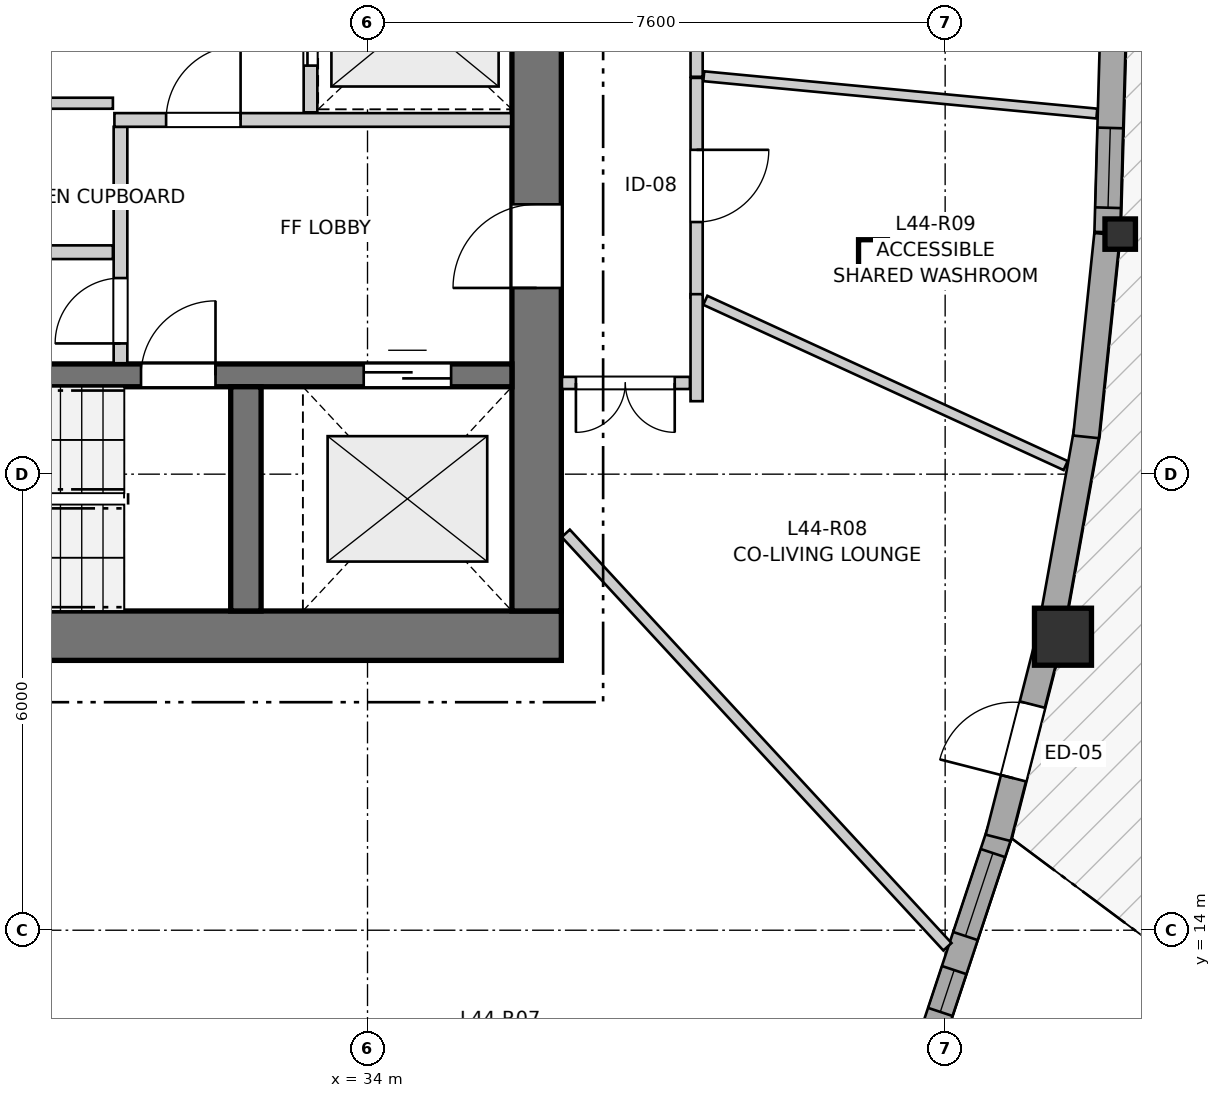
"""IFC4 building model, lengths in metres.
Left out: names, types, materials, properties, quantities, classifications, styles, units other than length and angle.
Written with IfcOpenShell. Run it as: python <this file> out.ifc"""

import sys

from ifc_helpers import new_model, si_unit, direction, frame, frame_2d, origin, origin_2d, place, context, subcontext, project, spatial, rectangle, i_section, extrude, source, transform, mapped, element, fill, save


model = new_model("IFC4")
c1 = context("Model", 3, precision=1e-05, world=origin(), true_north=direction((0.0, 1.0)))
c2 = subcontext(c1, "Body", "Model", "MODEL_VIEW")
j1 = project(units=[si_unit("LENGTHUNIT", "METRE"), si_unit("PLANEANGLEUNIT", "RADIAN")], contexts=[c1])
p1 = place(None, origin())
s1 = spatial("IfcSite", under=j1, at=p1, CompositionType="ELEMENT")
p2 = place(p1, origin())
s2 = spatial("IfcBuilding", under=s1, at=p2, CompositionType="ELEMENT")
p3 = place(p2, frame((0.0, 0.0, 149.0)))
s3 = spatial("IfcBuildingStorey", under=s2, at=p3, CompositionType="ELEMENT", Elevation=149.0)
p4 = place(p3, frame((24.15, 17.875, 0.0), z_axis=(0.0, 0.0, 1.0), x_axis=(1.0, 0.0, 0.0)))
e1 = element("IfcWall", 1, at=p4, inside=s3, PredefinedType="SHEAR", context=c2, shape_type="SweptSolid", body=[
    extrude(rectangle(XDim=12.4, YDim=0.65, at=frame_2d((6.2, 0.0))), origin(), (0.0, 0.0, 1.0), 2.935),
])
p5 = place(p3, frame((36.225, 18.2, 0.0), z_axis=(0.0, 0.0, 1.0), x_axis=(0.0, 1.0, 0.0)))
e2 = element("IfcWall", 2, at=p5, inside=s3, PredefinedType="SHEAR", context=c2, shape_type="SweptSolid", body=[
    extrude(rectangle(XDim=15.6, YDim=0.65, at=frame_2d((7.8, 0.0))), origin(), (0.0, 0.0, 1.0), 2.935),
])
p6 = place(p5, frame((4.25, 0.0, 0.0)))
e3 = element("IfcOpeningElement", 3, at=p6, cuts=e2, PredefinedType="OPENING", context=c2, shape_type="SweptSolid", body=[
    extrude(rectangle(XDim=1.1, YDim=2.15, at=frame_2d((0.55, 1.075))), frame((0.0, 0.335, 0.0), z_axis=(0.0, -1.0, 0.0), x_axis=(1.0, 0.0, 0.0)), (0.0, 0.0, 1.0), 0.67),
])
p7 = place(p5, frame((10.25, 0.0, 0.0)))
e4 = element("IfcOpeningElement", 4, at=p7, cuts=e2, PredefinedType="OPENING", context=c2, shape_type="SweptSolid", body=[
    extrude(rectangle(XDim=1.1, YDim=2.15, at=frame_2d((0.55, 1.075))), frame((0.0, 0.335, 0.0), z_axis=(0.0, -1.0, 0.0), x_axis=(1.0, 0.0, 0.0)), (0.0, 0.0, 1.0), 0.67),
])
p8 = place(p3, frame((24.8, 21.3, 0.0), z_axis=(0.0, 0.0, 1.0), x_axis=(1.0, 0.0, 0.0)))
e5 = element("IfcWall", 5, at=p8, inside=s3, PredefinedType="SHEAR", context=c2, shape_type="SweptSolid", body=[
    extrude(rectangle(XDim=11.1, YDim=0.3, at=frame_2d((5.55, 0.0))), origin(), (0.0, 0.0, 1.0), 2.935),
])
p9 = place(p8, frame((6.22, 0.0, 0.0)))
e6 = element("IfcOpeningElement", 6, at=p9, cuts=e5, PredefinedType="OPENING", context=c2, shape_type="SweptSolid", body=[
    extrude(rectangle(XDim=0.98, YDim=2.15, at=frame_2d((0.49, 1.075))), frame((0.0, 0.16, 0.0), z_axis=(0.0, -1.0, 0.0), x_axis=(1.0, 0.0, 0.0)), (0.0, 0.0, 1.0), 0.32),
])
p10 = place(p8, frame((9.15, 0.0, 0.0)))
e7 = element("IfcOpeningElement", 7, at=p10, cuts=e5, PredefinedType="OPENING", context=c2, shape_type="SweptSolid", body=[
    extrude(rectangle(XDim=1.15, YDim=2.15, at=frame_2d((0.575, 1.075))), frame((0.0, 0.16, 0.0), z_axis=(0.0, -1.0, 0.0), x_axis=(1.0, 0.0, 0.0)), (0.0, 0.0, 1.0), 0.32),
])
p11 = place(p3, frame((32.4, 18.2, 0.0), z_axis=(0.0, 0.0, 1.0), x_axis=(0.0, 1.0, 0.0)))
e8 = element("IfcWall", 8, at=p11, inside=s3, PredefinedType="SHEAR", context=c2, shape_type="SweptSolid", body=[
    extrude(rectangle(XDim=2.95, YDim=0.4, at=frame_2d((1.475, 0.0))), origin(), (0.0, 0.0, 1.0), 2.935),
])
m1 = source(origin(), c2, "Body", "SweptSolid", [
    extrude(rectangle(XDim=0.75, YDim=0.75, at=origin_2d()), origin(), (0.0, 0.0, 1.0), 2.935),
])
p12 = place(p3, frame((43.15, 17.862, 0.0), z_axis=(0.0, 0.0, 1.0), x_axis=(1.0, 0.0, 0.0)))
e9 = element("IfcColumn", 9, at=p12, inside=s3, PredefinedType="COLUMN", context=c2, shape_type="MappedRepresentation", body=[
    mapped(m1, transform((0.0, 0.0, 0.0), x_axis=(1.0, 0.0, 0.0), y_axis=(0.0, 1.0, 0.0), z_axis=(0.0, 0.0, 1.0), scale=1.0)),
])
m2 = source(origin(), c2, "Body", "SweptSolid", [
    extrude(i_section(OverallWidth=0.401, OverallDepth=0.399, WebThickness=0.023, FlangeThickness=0.036, FilletRadius=0.015, at=origin_2d()), origin(), (0.0, 0.0, 1.0), 2.935),
])
p13 = place(p3, frame((43.903, 23.158, 0.0), z_axis=(0.0, 0.0, 1.0), x_axis=(1.0, 0.0, 0.0)))
e10 = element("IfcColumn", 10, at=p13, inside=s3, PredefinedType="PILASTER", context=c2, shape_type="MappedRepresentation", body=[
    mapped(m2, transform((0.0, 0.0, 0.0), x_axis=(1.0, 0.0, 0.0), y_axis=(0.0, 1.0, 0.0), z_axis=(0.0, 0.0, 1.0), scale=1.0)),
])
p14 = place(p3, frame((41.438, 12.629, 0.0), z_axis=(0.0, 0.0, 1.0), x_axis=(0.314534815528, 0.949245937479, 0.0)))
e11 = element("IfcWall", 11, at=p14, inside=s3, PredefinedType="SOLIDWALL", context=c2, shape_type="SweptSolid", body=[
    extrude(rectangle(XDim=2.813, YDim=0.34, at=frame_2d((1.406, 0.0))), origin(), (0.0, 0.0, 1.0), 2.515),
])
p15 = place(p14, frame((0.312, 0.0, 0.82)))
e12 = element("IfcOpeningElement", 12, at=p15, cuts=e11, PredefinedType="OPENING", context=c2, shape_type="SweptSolid", body=[
    extrude(rectangle(XDim=0.58, YDim=1.35, at=frame_2d((0.29, 0.675))), frame((0.0, 0.18, 0.0), z_axis=(0.0, -1.0, 0.0), x_axis=(1.0, 0.0, 0.0)), (0.0, 0.0, 1.0), 0.36),
])
p16 = place(p14, frame((1.363, 0.0, 0.82)))
e13 = element("IfcOpeningElement", 13, at=p16, cuts=e11, PredefinedType="OPENING", context=c2, shape_type="SweptSolid", body=[
    extrude(rectangle(XDim=1.15, YDim=1.2, at=frame_2d((0.575, 0.6))), frame((0.0, 0.18, 0.0), z_axis=(0.0, -1.0, 0.0), x_axis=(1.0, 0.0, 0.0)), (0.0, 0.0, 1.0), 0.36),
])
p17 = place(p3, frame((42.298, 15.215, 0.0), z_axis=(0.0, 0.0, 1.0), x_axis=(0.24779460158, 0.968812590457, 0.0)))
e14 = element("IfcWall", 14, at=p17, inside=s3, PredefinedType="SOLIDWALL", context=c2, shape_type="SweptSolid", body=[
    extrude(rectangle(XDim=2.62, YDim=0.34, at=frame_2d((1.31, 0.0))), origin(), (0.0, 0.0, 1.0), 2.515),
])
p18 = place(p17, frame((0.81, 0.0, 0.0)))
e15 = element("IfcOpeningElement", 15, at=p18, cuts=e14, PredefinedType="OPENING", context=c2, shape_type="SweptSolid", body=[
    extrude(rectangle(XDim=1.0, YDim=2.1, at=frame_2d((0.5, 1.05))), frame((0.0, 0.18, 0.0), z_axis=(0.0, -1.0, 0.0), x_axis=(1.0, 0.0, 0.0)), (0.0, 0.0, 1.0), 0.36),
])
p19 = place(p3, frame((43.01, 18.044, 0.0), z_axis=(0.0, 0.0, 1.0), x_axis=(0.177116262048, 0.984189935794, 0.0)))
e16 = element("IfcWall", 16, at=p19, inside=s3, PredefinedType="SOLIDWALL", context=c2, shape_type="SweptSolid", body=[
    extrude(rectangle(XDim=2.575, YDim=0.34, at=frame_2d((1.288, 0.0))), origin(), (0.0, 0.0, 1.0), 2.515),
])
p20 = place(p3, frame((43.454, 20.49, 0.0), z_axis=(0.0, 0.0, 1.0), x_axis=(0.103669919384, 0.994611757328, 0.0)))
e17 = element("IfcWall", 17, at=p20, inside=s3, PredefinedType="SOLIDWALL", context=c2, shape_type="SweptSolid", body=[
    extrude(rectangle(XDim=2.68, YDim=0.34, at=frame_2d((1.34, 0.0))), origin(), (0.0, 0.0, 1.0), 2.515),
])
p21 = place(p3, frame((43.734, 23.183, 0.0), z_axis=(0.0, 0.0, 1.0), x_axis=(0.028311286797, 0.999599155182, 0.0)))
e18 = element("IfcWall", 18, at=p21, inside=s3, PredefinedType="SOLIDWALL", context=c2, shape_type="SweptSolid", body=[
    extrude(rectangle(XDim=2.665, YDim=0.34, at=frame_2d((1.332, 0.0))), origin(), (0.0, 0.0, 1.0), 2.515),
])
p22 = place(p21, frame((0.323, 0.0, 0.82)))
e19 = element("IfcOpeningElement", 19, at=p22, cuts=e18, PredefinedType="OPENING", context=c2, shape_type="SweptSolid", body=[
    extrude(rectangle(XDim=1.05, YDim=1.45, at=frame_2d((0.525, 0.725))), frame((0.0, 0.18, 0.0), z_axis=(0.0, -1.0, 0.0), x_axis=(1.0, 0.0, 0.0)), (0.0, 0.0, 1.0), 0.36),
])
p23 = place(p3, frame((30.75, 21.46, 0.0), z_axis=(0.0, 0.0, 1.0), x_axis=(0.0, 1.0, 0.0)))
e20 = element("IfcWall", 20, at=p23, inside=s3, PredefinedType="PARTITIONING", context=c2, shape_type="SweptSolid", body=[
    extrude(rectangle(XDim=3.11, YDim=0.18, at=frame_2d((1.555, 0.0))), origin(), (0.0, 0.0, 1.0), 2.935),
])
p24 = place(p23, frame((0.26, 0.0, 0.0)))
e21 = element("IfcOpeningElement", 21, at=p24, cuts=e20, PredefinedType="OPENING", context=c2, shape_type="SweptSolid", body=[
    extrude(rectangle(XDim=0.86, YDim=2.05, at=frame_2d((0.43, 1.025))), frame((0.0, 0.1, 0.0), z_axis=(0.0, -1.0, 0.0), x_axis=(1.0, 0.0, 0.0)), (0.0, 0.0, 1.0), 0.2),
])
p25 = place(p3, frame((30.67, 24.66, 0.0), z_axis=(0.0, 0.0, 1.0), x_axis=(1.0, 0.0, 0.0)))
e22 = element("IfcWall", 22, at=p25, inside=s3, PredefinedType="PARTITIONING", context=c2, shape_type="SweptSolid", body=[
    extrude(rectangle(XDim=5.22, YDim=0.18, at=frame_2d((2.61, 0.0))), origin(), (0.0, 0.0, 1.0), 2.935),
])
p26 = place(p25, frame((0.68, 0.0, 0.0)))
e23 = element("IfcOpeningElement", 23, at=p26, cuts=e22, PredefinedType="OPENING", context=c2, shape_type="SweptSolid", body=[
    extrude(rectangle(XDim=0.98, YDim=2.15, at=frame_2d((0.49, 1.075))), frame((0.0, 0.1, 0.0), z_axis=(0.0, -1.0, 0.0), x_axis=(1.0, 0.0, 0.0)), (0.0, 0.0, 1.0), 0.2),
])
p27 = place(p3, frame((33.25, 24.76, 0.0), z_axis=(0.0, 0.0, 1.0), x_axis=(0.0, 1.0, 0.0)))
e24 = element("IfcWall", 24, at=p27, inside=s3, PredefinedType="PARTITIONING", context=c2, shape_type="SweptSolid", body=[
    extrude(rectangle(XDim=2.48, YDim=0.18, at=frame_2d((1.24, 0.0))), origin(), (0.0, 0.0, 1.0), 2.935),
])
p28 = place(p27, frame((0.615, 0.0, 0.0)))
e25 = element("IfcOpeningElement", 25, at=p28, cuts=e24, PredefinedType="OPENING", context=c2, shape_type="SweptSolid", body=[
    extrude(rectangle(XDim=1.25, YDim=2.15, at=frame_2d((0.625, 1.075))), frame((0.0, 0.1, 0.0), z_axis=(0.0, -1.0, 0.0), x_axis=(1.0, 0.0, 0.0)), (0.0, 0.0, 1.0), 0.2),
])
p29 = place(p3, frame((24.81, 22.92, 0.0), z_axis=(0.0, 0.0, 1.0), x_axis=(1.0, 0.0, 0.0)))
e26 = element("IfcWall", 26, at=p29, inside=s3, PredefinedType="PARTITIONING", context=c2, shape_type="SweptSolid", body=[
    extrude(rectangle(XDim=5.84, YDim=0.18, at=frame_2d((2.92, 0.0))), origin(), (0.0, 0.0, 1.0), 2.935),
])
p30 = place(p3, frame((28.13, 24.88, 0.0), z_axis=(0.0, 0.0, 1.0), x_axis=(1.0, 0.0, 0.0)))
e27 = element("IfcWall", 27, at=p30, inside=s3, PredefinedType="PARTITIONING", context=c2, shape_type="SweptSolid", body=[
    extrude(rectangle(XDim=2.52, YDim=0.145, at=frame_2d((1.26, 0.0))), origin(), (0.0, 0.0, 1.0), 2.935),
])
p31 = place(p30, frame((0.82, 0.0, 0.0)))
e28 = element("IfcOpeningElement", 28, at=p31, cuts=e27, PredefinedType="OPENING", context=c2, shape_type="SweptSolid", body=[
    extrude(rectangle(XDim=0.86, YDim=2.05, at=frame_2d((0.43, 1.025))), frame((0.0, 0.083, 0.0), z_axis=(0.0, -1.0, 0.0), x_axis=(1.0, 0.0, 0.0)), (0.0, 0.0, 1.0), 0.165),
])
p32 = place(p3, frame((38.33, 29.792, 0.0), z_axis=(0.0, 0.0, 1.0), x_axis=(0.0, -1.0, 0.0)))
e29 = element("IfcWall", 29, at=p32, inside=s3, PredefinedType="PARTITIONING", context=c2, shape_type="SweptSolid", body=[
    extrude(rectangle(XDim=4.564, YDim=0.16, at=frame_2d((2.282, 0.0))), origin(), (0.0, 0.0, 1.0), 2.935),
])
p33 = place(p32, frame((0.487, 0.0, 0.0)))
e30 = element("IfcOpeningElement", 30, at=p33, cuts=e29, PredefinedType="OPENING", context=c2, shape_type="SweptSolid", body=[
    extrude(rectangle(XDim=0.92, YDim=2.1, at=frame_2d((0.46, 1.05))), frame((0.0, 0.09, 0.0), z_axis=(0.0, -1.0, 0.0), x_axis=(1.0, 0.0, 0.0)), (0.0, 0.0, 1.0), 0.18),
])
p34 = place(p3, frame((38.33, 25.213, 0.0), z_axis=(0.0, 0.0, 1.0), x_axis=(0.0, -1.0, 0.0)))
e31 = element("IfcWall", 31, at=p34, inside=s3, PredefinedType="PARTITIONING", context=c2, shape_type="SweptSolid", body=[
    extrude(rectangle(XDim=2.89, YDim=0.16, at=frame_2d((1.445, 0.0))), origin(), (0.0, 0.0, 1.0), 2.935),
])
p35 = place(p34, frame((0.946, 0.0, 0.0)))
e32 = element("IfcOpeningElement", 32, at=p35, cuts=e31, PredefinedType="OPENING", context=c2, shape_type="SweptSolid", body=[
    extrude(rectangle(XDim=0.95, YDim=2.1, at=frame_2d((0.475, 1.05))), frame((0.0, 0.09, 0.0), z_axis=(0.0, -1.0, 0.0), x_axis=(1.0, 0.0, 0.0)), (0.0, 0.0, 1.0), 0.18),
])
p36 = place(p3, frame((38.242, 21.2, 0.0), z_axis=(0.0, 0.0, 1.0), x_axis=(-1.0, 0.0, 0.0)))
e33 = element("IfcWall", 33, at=p36, inside=s3, PredefinedType="PARTITIONING", context=c2, shape_type="SweptSolid", body=[
    extrude(rectangle(XDim=1.684, YDim=0.16, at=frame_2d((0.842, 0.0))), origin(), (0.0, 0.0, 1.0), 2.935),
])
p37 = place(p36, frame((0.2, 0.0, 0.0)))
e34 = element("IfcOpeningElement", 34, at=p37, cuts=e33, PredefinedType="OPENING", context=c2, shape_type="SweptSolid", body=[
    extrude(rectangle(XDim=1.3, YDim=2.1, at=frame_2d((0.65, 1.05))), frame((0.0, 0.09, 0.0), z_axis=(0.0, -1.0, 0.0), x_axis=(1.0, 0.0, 0.0)), (0.0, 0.0, 1.0), 0.18),
])
p38 = place(p3, frame((36.609, 19.221, 0.0), z_axis=(0.0, 0.0, 1.0), x_axis=(0.67832941292, -0.734757924467, 0.0)))
e35 = element("IfcWall", 35, at=p38, inside=s3, PredefinedType="PARTITIONING", context=c2, shape_type="SweptSolid", body=[
    extrude(rectangle(XDim=7.403, YDim=0.145, at=frame_2d((3.701, 0.0))), origin(), (0.0, 0.0, 1.0), 2.935),
])
p39 = place(p3, frame((38.444, 22.288, 0.0), z_axis=(0.0, 0.0, 1.0), x_axis=(0.908945866603, -0.416914153736, 0.0)))
e36 = element("IfcWall", 36, at=p39, inside=s3, PredefinedType="PARTITIONING", context=c2, shape_type="SweptSolid", body=[
    extrude(rectangle(XDim=5.217, YDim=0.13, at=frame_2d((2.608, 0.0))), origin(), (0.0, 0.0, 1.0), 2.103),
])
p40 = place(p3, frame((38.424, 25.235, 0.0), z_axis=(0.0, 0.0, 1.0), x_axis=(0.995523942217, -0.094509684549, 0.0)))
e37 = element("IfcWall", 37, at=p40, inside=s3, PredefinedType="PARTITIONING", context=c2, shape_type="SweptSolid", body=[
    extrude(rectangle(XDim=5.195, YDim=0.13, at=frame_2d((2.597, 0.0))), origin(), (0.0, 0.0, 1.0), 2.935),
])
p41 = place(p3, frame((38.33, 20.96, 0.0), z_axis=(0.0, 0.0, 1.0), x_axis=(0.0, 1.0, 0.0)))
e38 = element("IfcWall", 38, at=p41, inside=s3, PredefinedType="PARTITIONING", context=c2, shape_type="SweptSolid", body=[
    extrude(rectangle(XDim=1.408, YDim=0.16, at=frame_2d((0.704, 0.0))), origin(), (0.0, 0.0, 1.0), 2.935),
])
m3 = source(origin(), c2, "Body", "SweptSolid", [
    extrude(rectangle(XDim=0.58, YDim=1.35, at=frame_2d((0.29, 0.675))), frame((0.0, 0.03, 0.0), z_axis=(0.0, -1.0, 0.0), x_axis=(1.0, 0.0, 0.0)), (0.0, 0.0, 1.0), 0.06),
])
p42 = place(p15, origin())
e39 = element("IfcWindow", 39, at=p42, inside=s3, PartitioningType="SINGLE_PANEL", PredefinedType="WINDOW", context=c2, shape_type="MappedRepresentation", body=[
    mapped(m3, transform((0.0, 0.0, 0.0), x_axis=(1.0, 0.0, 0.0), y_axis=(0.0, 1.0, 0.0), z_axis=(0.0, 0.0, 1.0), scale=1.0)),
])
fill(e12, e39)
m4 = source(origin(), c2, "Body", "SweptSolid", [
    extrude(rectangle(XDim=1.15, YDim=1.2, at=frame_2d((0.575, 0.6))), frame((0.0, 0.03, 0.0), z_axis=(0.0, -1.0, 0.0), x_axis=(1.0, 0.0, 0.0)), (0.0, 0.0, 1.0), 0.06),
])
p43 = place(p16, origin())
e40 = element("IfcWindow", 40, at=p43, inside=s3, PartitioningType="SINGLE_PANEL", PredefinedType="WINDOW", context=c2, shape_type="MappedRepresentation", body=[
    mapped(m4, transform((0.0, 0.0, 0.0), x_axis=(1.0, 0.0, 0.0), y_axis=(0.0, 1.0, 0.0), z_axis=(0.0, 0.0, 1.0), scale=1.0)),
])
fill(e13, e40)
m5 = source(origin(), c2, "Body", "SweptSolid", [
    extrude(rectangle(XDim=1.05, YDim=1.45, at=frame_2d((0.525, 0.725))), frame((0.0, 0.03, 0.0), z_axis=(0.0, -1.0, 0.0), x_axis=(1.0, 0.0, 0.0)), (0.0, 0.0, 1.0), 0.06),
])
p44 = place(p22, origin())
e41 = element("IfcWindow", 41, at=p44, inside=s3, PartitioningType="SINGLE_PANEL", PredefinedType="WINDOW", context=c2, shape_type="MappedRepresentation", body=[
    mapped(m5, transform((0.0, 0.0, 0.0), x_axis=(1.0, 0.0, 0.0), y_axis=(0.0, 1.0, 0.0), z_axis=(0.0, 0.0, 1.0), scale=1.0)),
])
fill(e19, e41)
m6 = source(origin(), c2, "Body", "SweptSolid", [
    extrude(rectangle(XDim=1.0, YDim=2.1, at=frame_2d((0.5, 1.05))), frame((0.0, 0.025, 0.0), z_axis=(0.0, -1.0, 0.0), x_axis=(1.0, 0.0, 0.0)), (0.0, 0.0, 1.0), 0.05),
])
p45 = place(p18, origin())
e42 = element("IfcDoor", 42, at=p45, inside=s3, OperationType="SINGLE_SWING_LEFT", PredefinedType="DOOR", context=c2, shape_type="MappedRepresentation", body=[
    mapped(m6, transform((0.0, 0.0, 0.0), x_axis=(1.0, 0.0, 0.0), y_axis=(0.0, 1.0, 0.0), z_axis=(0.0, 0.0, 1.0), scale=1.0)),
])
fill(e15, e42)
m7 = source(origin(), c2, "Body", "SweptSolid", [
    extrude(rectangle(XDim=0.98, YDim=2.15, at=frame_2d((0.49, 1.075))), frame((0.0, 0.025, 0.0), z_axis=(0.0, -1.0, 0.0), x_axis=(1.0, 0.0, 0.0)), (0.0, 0.0, 1.0), 0.05),
])
p46 = place(p9, origin())
e43 = element("IfcDoor", 43, at=p46, inside=s3, OperationType="SINGLE_SWING_RIGHT", PredefinedType="DOOR", context=c2, shape_type="MappedRepresentation", body=[
    mapped(m7, transform((0.0, 0.0, 0.0), x_axis=(1.0, 0.0, 0.0), y_axis=(0.0, 1.0, 0.0), z_axis=(0.0, 0.0, 1.0), scale=1.0)),
])
fill(e6, e43)
m8 = source(origin(), c2, "Body", "SweptSolid", [
    extrude(rectangle(XDim=1.15, YDim=2.15, at=frame_2d((0.575, 1.075))), frame((0.0, 0.025, 0.0), z_axis=(0.0, -1.0, 0.0), x_axis=(1.0, 0.0, 0.0)), (0.0, 0.0, 1.0), 0.05),
])
p47 = place(p10, origin())
e44 = element("IfcDoor", 44, at=p47, inside=s3, OperationType="DOUBLE_DOOR_SLIDING", PredefinedType="DOOR", context=c2, shape_type="MappedRepresentation", body=[
    mapped(m8, transform((0.0, 0.0, 0.0), x_axis=(1.0, 0.0, 0.0), y_axis=(0.0, 1.0, 0.0), z_axis=(0.0, 0.0, 1.0), scale=1.0)),
])
fill(e7, e44)
m9 = source(origin(), c2, "Body", "SweptSolid", [
    extrude(rectangle(XDim=1.1, YDim=2.15, at=frame_2d((0.55, 1.075))), frame((0.0, 0.025, 0.0), z_axis=(0.0, -1.0, 0.0), x_axis=(1.0, 0.0, 0.0)), (0.0, 0.0, 1.0), 0.05),
])
p48 = place(p6, origin())
e45 = element("IfcDoor", 45, at=p48, inside=s3, OperationType="SINGLE_SWING_LEFT", PredefinedType="DOOR", context=c2, shape_type="MappedRepresentation", body=[
    mapped(m9, transform((0.0, 0.0, 0.0), x_axis=(1.0, 0.0, 0.0), y_axis=(0.0, 1.0, 0.0), z_axis=(0.0, 0.0, 1.0), scale=1.0)),
])
fill(e3, e45)
m10 = source(origin(), c2, "Body", "SweptSolid", [
    extrude(rectangle(XDim=0.86, YDim=2.05, at=frame_2d((0.43, 1.025))), frame((0.0, 0.025, 0.0), z_axis=(0.0, -1.0, 0.0), x_axis=(1.0, 0.0, 0.0)), (0.0, 0.0, 1.0), 0.05),
])
p49 = place(p24, origin())
e46 = element("IfcDoor", 46, at=p49, inside=s3, OperationType="SINGLE_SWING_LEFT", PredefinedType="DOOR", context=c2, shape_type="MappedRepresentation", body=[
    mapped(m10, transform((0.0, 0.0, 0.0), x_axis=(1.0, 0.0, 0.0), y_axis=(0.0, 1.0, 0.0), z_axis=(0.0, 0.0, 1.0), scale=1.0)),
])
fill(e21, e46)
p50 = place(p26, origin())
e47 = element("IfcDoor", 47, at=p50, inside=s3, OperationType="SINGLE_SWING_RIGHT", PredefinedType="DOOR", context=c2, shape_type="MappedRepresentation", body=[
    mapped(m7, transform((0.0, 0.0, 0.0), x_axis=(1.0, 0.0, 0.0), y_axis=(0.0, 1.0, 0.0), z_axis=(0.0, 0.0, 1.0), scale=1.0)),
])
fill(e23, e47)
m11 = source(origin(), c2, "Body", "SweptSolid", [
    extrude(rectangle(XDim=1.25, YDim=2.15, at=frame_2d((0.625, 1.075))), frame((0.0, 0.025, 0.0), z_axis=(0.0, -1.0, 0.0), x_axis=(1.0, 0.0, 0.0)), (0.0, 0.0, 1.0), 0.05),
])
p51 = place(p28, origin())
e48 = element("IfcDoor", 48, at=p51, inside=s3, OperationType="DOUBLE_DOOR_SLIDING", PredefinedType="DOOR", context=c2, shape_type="MappedRepresentation", body=[
    mapped(m11, transform((0.0, 0.0, 0.0), x_axis=(1.0, 0.0, 0.0), y_axis=(0.0, 1.0, 0.0), z_axis=(0.0, 0.0, 1.0), scale=1.0)),
])
fill(e25, e48)
m12 = source(origin(), c2, "Body", "SweptSolid", [
    extrude(rectangle(XDim=0.95, YDim=2.1, at=frame_2d((0.475, 1.05))), frame((0.0, 0.025, 0.0), z_axis=(0.0, -1.0, 0.0), x_axis=(1.0, 0.0, 0.0)), (0.0, 0.0, 1.0), 0.05),
])
p52 = place(p35, origin())
e49 = element("IfcDoor", 49, at=p52, inside=s3, OperationType="SINGLE_SWING_LEFT", PredefinedType="DOOR", context=c2, shape_type="MappedRepresentation", body=[
    mapped(m12, transform((0.0, 0.0, 0.0), x_axis=(1.0, 0.0, 0.0), y_axis=(0.0, 1.0, 0.0), z_axis=(0.0, 0.0, 1.0), scale=1.0)),
])
fill(e32, e49)
m13 = source(origin(), c2, "Body", "SweptSolid", [
    extrude(rectangle(XDim=1.3, YDim=2.1, at=frame_2d((0.65, 1.05))), frame((0.0, 0.025, 0.0), z_axis=(0.0, -1.0, 0.0), x_axis=(1.0, 0.0, 0.0)), (0.0, 0.0, 1.0), 0.05),
])
p53 = place(p37, origin())
e50 = element("IfcDoor", 50, at=p53, inside=s3, OperationType="DOUBLE_DOOR_SINGLE_SWING", PredefinedType="DOOR", context=c2, shape_type="MappedRepresentation", body=[
    mapped(m13, transform((0.0, 0.0, 0.0), x_axis=(1.0, 0.0, 0.0), y_axis=(0.0, 1.0, 0.0), z_axis=(0.0, 0.0, 1.0), scale=1.0)),
])
fill(e34, e50)
save(model, sys.argv[1])
